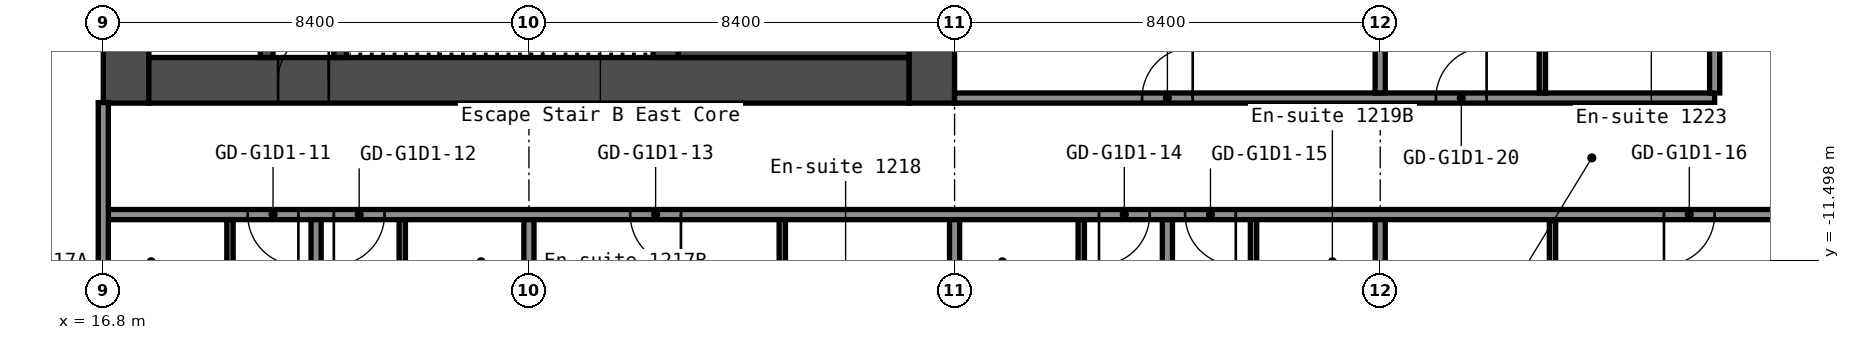
"""IFC4 building model, lengths in metres.
Left out: names, types, materials, properties, quantities, classifications, styles, units other than length and angle.
Written with IfcOpenShell. Run it as: python <this file> out.ifc"""

import sys

from ifc_helpers import new_model, si_unit, direction, frame, frame_2d, origin, place, context, subcontext, project, spatial, rectangle, extrude, element, fill, save


model = new_model("IFC4")
c1 = context("Model", 3, precision=1e-05, world=origin(), true_north=direction((0.0, 1.0)))
c2 = subcontext(c1, "Body", "Model", "MODEL_VIEW")
j1 = project(units=[si_unit("LENGTHUNIT", "METRE"), si_unit("PLANEANGLEUNIT", "RADIAN")], contexts=[c1])
p1 = place(None, origin())
s1 = spatial("IfcSite", under=j1, at=p1, CompositionType="ELEMENT")
p2 = place(p1, origin())
s2 = spatial("IfcBuilding", under=s1, at=p2, CompositionType="ELEMENT")
p3 = place(p2, frame((0.0, 0.0, 45.4)))
s3 = spatial("IfcBuildingStorey", under=s2, at=p3, CompositionType="ELEMENT", Elevation=45.4)
p4 = place(p3, frame((17.25, -8.4, 0.0), z_axis=(0.0, 0.0, 1.0), x_axis=(0.0, 1.0, 0.0)))
e1 = element("IfcWall", 1, at=p4, inside=s3, PredefinedType="SHEAR", context=c2, shape_type="SweptSolid", body=[
    extrude(rectangle(XDim=16.8, YDim=0.9, at=frame_2d((8.4, 0.0))), origin(), (0.0, 0.0, 1.0), 2.8),
])
p5 = place(p4, frame((12.75, 0.0, 0.0)))
e2 = element("IfcOpeningElement", 2, at=p5, cuts=e1, PredefinedType="OPENING", context=c2, shape_type="SweptSolid", body=[
    extrude(rectangle(XDim=1.2, YDim=2.1, at=frame_2d((0.6, 1.05))), frame((0.0, 0.46, 0.0), z_axis=(0.0, -1.0, 0.0), x_axis=(1.0, 0.0, 0.0)), (0.0, 0.0, 1.0), 0.92),
])
p6 = place(p4, frame((2.85, 0.0, 0.0)))
e3 = element("IfcOpeningElement", 3, at=p6, cuts=e1, PredefinedType="OPENING", context=c2, shape_type="SweptSolid", body=[
    extrude(rectangle(XDim=1.2, YDim=2.1, at=frame_2d((0.6, 1.05))), frame((0.0, 0.46, 0.0), z_axis=(0.0, -1.0, 0.0), x_axis=(1.0, 0.0, 0.0)), (0.0, 0.0, 1.0), 0.92),
])
p7 = place(p3, frame((33.15, -8.4, 0.0), z_axis=(0.0, 0.0, 1.0), x_axis=(0.0, 1.0, 0.0)))
e4 = element("IfcWall", 4, at=p7, inside=s3, PredefinedType="SHEAR", context=c2, shape_type="SweptSolid", body=[
    extrude(rectangle(XDim=16.8, YDim=0.9, at=frame_2d((8.4, 0.0))), origin(), (0.0, 0.0, 1.0), 2.8),
])
p8 = place(p3, frame((17.7, -7.95, 0.0), z_axis=(0.0, 0.0, 1.0), x_axis=(1.0, 0.0, 0.0)))
e5 = element("IfcWall", 5, at=p8, inside=s3, PredefinedType="SHEAR", context=c2, shape_type="SweptSolid", body=[
    extrude(rectangle(XDim=15.0, YDim=0.9, at=frame_2d((7.5, 0.0))), origin(), (0.0, 0.0, 1.0), 2.8),
])
p9 = place(p8, frame((2.55, 0.0, 0.0)))
e6 = element("IfcOpeningElement", 6, at=p9, cuts=e5, PredefinedType="OPENING", context=c2, shape_type="SweptSolid", body=[
    extrude(rectangle(XDim=1.0, YDim=2.1, at=frame_2d((0.5, 1.05))), frame((0.0, 0.46, 0.0), z_axis=(0.0, -1.0, 0.0), x_axis=(1.0, 0.0, 0.0)), (0.0, 0.0, 1.0), 0.92),
])
p10 = place(p3, frame((20.025, -7.5, 0.0), z_axis=(0.0, 0.0, 1.0), x_axis=(0.0, 1.0, 0.0)))
e7 = element("IfcWall", 7, at=p10, inside=s3, PredefinedType="SHEAR", context=c2, shape_type="SweptSolid", body=[
    extrude(rectangle(XDim=6.3, YDim=0.25, at=frame_2d((3.15, 0.0))), origin(), (0.0, 0.0, 1.0), 2.8),
])
p11 = place(p10, frame((2.4, 0.0, 0.0)))
e8 = element("IfcOpeningElement", 8, at=p11, cuts=e7, PredefinedType="OPENING", context=c2, shape_type="SweptSolid", body=[
    extrude(rectangle(XDim=1.0, YDim=2.1, at=frame_2d((0.5, 1.05))), frame((0.0, 0.135, 0.0), z_axis=(0.0, -1.0, 0.0), x_axis=(1.0, 0.0, 0.0)), (0.0, 0.0, 1.0), 0.27),
])
p12 = place(p3, frame((21.475, -7.5, 0.0), z_axis=(0.0, 0.0, 1.0), x_axis=(0.0, 1.0, 0.0)))
e9 = element("IfcWall", 9, at=p12, inside=s3, PredefinedType="SHEAR", context=c2, shape_type="SweptSolid", body=[
    extrude(rectangle(XDim=3.75, YDim=0.25, at=frame_2d((1.875, 0.0))), origin(), (0.0, 0.0, 1.0), 2.8),
])
p13 = place(p12, frame((1.3, 0.0, 0.0)))
e10 = element("IfcOpeningElement", 10, at=p13, cuts=e9, PredefinedType="OPENING", context=c2, shape_type="SweptSolid", body=[
    extrude(rectangle(XDim=1.2, YDim=2.1, at=frame_2d((0.6, 1.05))), frame((0.0, 0.135, 0.0), z_axis=(0.0, -1.0, 0.0), x_axis=(1.0, 0.0, 0.0)), (0.0, 0.0, 1.0), 0.27),
])
p14 = place(p3, frame((27.9, -7.5, 0.0), z_axis=(0.0, 0.0, 1.0), x_axis=(0.0, 1.0, 0.0)))
e11 = element("IfcWall", 11, at=p14, inside=s3, PredefinedType="SHEAR", context=c2, shape_type="SweptSolid", body=[
    extrude(rectangle(XDim=3.75, YDim=0.5, at=frame_2d((1.875, 0.0))), origin(), (0.0, 0.0, 1.0), 2.8),
])
p15 = place(p3, frame((28.15, -6.75, 0.0), z_axis=(0.0, 0.0, 1.0), x_axis=(1.0, 0.0, 0.0)))
e12 = element("IfcWall", 12, at=p15, inside=s3, PredefinedType="SHEAR", context=c2, shape_type="SweptSolid", body=[
    extrude(rectangle(XDim=4.55, YDim=1.5, at=frame_2d((2.275, 0.0))), origin(), (0.0, 0.0, 1.0), 2.8),
])
p16 = place(p3, frame((16.8, -10.6, 0.0), z_axis=(0.0, 0.0, 1.0), x_axis=(1.0, 0.0, 0.0)))
e13 = element("IfcWall", 13, at=p16, inside=s3, PredefinedType="PARTITIONING", context=c2, shape_type="SweptSolid", body=[
    extrude(rectangle(XDim=34.3, YDim=0.2, at=frame_2d((17.15, 0.0))), origin(), (0.0, 0.0, 1.0), 2.8),
])
p17 = place(p16, frame((2.85, 0.0, 0.0)))
e14 = element("IfcOpeningElement", 14, at=p17, cuts=e13, PredefinedType="OPENING", context=c2, shape_type="SweptSolid", body=[
    extrude(rectangle(XDim=1.0, YDim=2.1, at=frame_2d((0.5, 1.05))), frame((0.0, 0.11, 0.0), z_axis=(0.0, -1.0, 0.0), x_axis=(1.0, 0.0, 0.0)), (0.0, 0.0, 1.0), 0.22),
])
p18 = place(p16, frame((4.55, 0.0, 0.0)))
e15 = element("IfcOpeningElement", 15, at=p18, cuts=e13, PredefinedType="OPENING", context=c2, shape_type="SweptSolid", body=[
    extrude(rectangle(XDim=1.0, YDim=2.1, at=frame_2d((0.5, 1.05))), frame((0.0, 0.11, 0.0), z_axis=(0.0, -1.0, 0.0), x_axis=(1.0, 0.0, 0.0)), (0.0, 0.0, 1.0), 0.22),
])
p19 = place(p16, frame((10.4, 0.0, 0.0)))
e16 = element("IfcOpeningElement", 16, at=p19, cuts=e13, PredefinedType="OPENING", context=c2, shape_type="SweptSolid", body=[
    extrude(rectangle(XDim=1.0, YDim=2.1, at=frame_2d((0.5, 1.05))), frame((0.0, 0.11, 0.0), z_axis=(0.0, -1.0, 0.0), x_axis=(1.0, 0.0, 0.0)), (0.0, 0.0, 1.0), 0.22),
])
p20 = place(p16, frame((19.65, 0.0, 0.0)))
e17 = element("IfcOpeningElement", 17, at=p20, cuts=e13, PredefinedType="OPENING", context=c2, shape_type="SweptSolid", body=[
    extrude(rectangle(XDim=1.0, YDim=2.1, at=frame_2d((0.5, 1.05))), frame((0.0, 0.11, 0.0), z_axis=(0.0, -1.0, 0.0), x_axis=(1.0, 0.0, 0.0)), (0.0, 0.0, 1.0), 0.22),
])
p21 = place(p16, frame((21.35, 0.0, 0.0)))
e18 = element("IfcOpeningElement", 18, at=p21, cuts=e13, PredefinedType="OPENING", context=c2, shape_type="SweptSolid", body=[
    extrude(rectangle(XDim=1.0, YDim=2.1, at=frame_2d((0.5, 1.05))), frame((0.0, 0.11, 0.0), z_axis=(0.0, -1.0, 0.0), x_axis=(1.0, 0.0, 0.0)), (0.0, 0.0, 1.0), 0.22),
])
p22 = place(p16, frame((30.8, 0.0, 0.0)))
e19 = element("IfcOpeningElement", 19, at=p22, cuts=e13, PredefinedType="OPENING", context=c2, shape_type="SweptSolid", body=[
    extrude(rectangle(XDim=1.0, YDim=2.1, at=frame_2d((0.5, 1.05))), frame((0.0, 0.11, 0.0), z_axis=(0.0, -1.0, 0.0), x_axis=(1.0, 0.0, 0.0)), (0.0, 0.0, 1.0), 0.22),
])
p23 = place(p3, frame((33.6, -8.3, 0.0), z_axis=(0.0, 0.0, 1.0), x_axis=(1.0, 0.0, 0.0)))
e20 = element("IfcWall", 20, at=p23, inside=s3, PredefinedType="PARTITIONING", context=c2, shape_type="SweptSolid", body=[
    extrude(rectangle(XDim=15.0, YDim=0.2, at=frame_2d((7.5, 0.0))), origin(), (0.0, 0.0, 1.0), 2.8),
])
p24 = place(p23, frame((3.7, 0.0, 0.0)))
e21 = element("IfcOpeningElement", 21, at=p24, cuts=e20, PredefinedType="OPENING", context=c2, shape_type="SweptSolid", body=[
    extrude(rectangle(XDim=1.0, YDim=2.1, at=frame_2d((0.5, 1.05))), frame((0.0, 0.11, 0.0), z_axis=(0.0, -1.0, 0.0), x_axis=(1.0, 0.0, 0.0)), (0.0, 0.0, 1.0), 0.22),
])
p25 = place(p23, frame((9.5, 0.0, 0.0)))
e22 = element("IfcOpeningElement", 22, at=p25, cuts=e20, PredefinedType="OPENING", context=c2, shape_type="SweptSolid", body=[
    extrude(rectangle(XDim=1.0, YDim=2.1, at=frame_2d((0.5, 1.05))), frame((0.0, 0.11, 0.0), z_axis=(0.0, -1.0, 0.0), x_axis=(1.0, 0.0, 0.0)), (0.0, 0.0, 1.0), 0.22),
])
p26 = place(p3, frame((16.8, -20.3, 0.0), z_axis=(0.0, 0.0, 1.0), x_axis=(0.0, 1.0, 0.0)))
e23 = element("IfcWall", 23, at=p26, inside=s3, PredefinedType="PARTITIONING", context=c2, shape_type="SweptSolid", body=[
    extrude(rectangle(XDim=11.91, YDim=0.2, at=frame_2d((5.955, 0.0))), origin(), (0.0, 0.0, 1.0), 2.8),
])
p27 = place(p3, frame((19.3, -13.6, 0.0), z_axis=(0.0, 0.0, 1.0), x_axis=(0.0, 1.0, 0.0)))
e24 = element("IfcWall", 24, at=p27, inside=s3, PredefinedType="PARTITIONING", context=c2, shape_type="SweptSolid", body=[
    extrude(rectangle(XDim=2.9, YDim=0.125, at=frame_2d((1.45, 0.0))), origin(), (0.0, 0.0, 1.0), 2.8),
])
p28 = place(p27, frame((0.6, 0.0, 0.0)))
e25 = element("IfcOpeningElement", 25, at=p28, cuts=e24, PredefinedType="OPENING", context=c2, shape_type="SweptSolid", body=[
    extrude(rectangle(XDim=0.8, YDim=2.1, at=frame_2d((0.4, 1.05))), frame((0.0, 0.073, 0.0), z_axis=(0.0, -1.0, 0.0), x_axis=(1.0, 0.0, 0.0)), (0.0, 0.0, 1.0), 0.145),
])
p29 = place(p3, frame((21.0, -20.3, 0.0), z_axis=(0.0, 0.0, 1.0), x_axis=(0.0, 1.0, 0.0)))
e26 = element("IfcWall", 26, at=p29, inside=s3, PredefinedType="PARTITIONING", context=c2, shape_type="SweptSolid", body=[
    extrude(rectangle(XDim=9.6, YDim=0.2, at=frame_2d((4.8, 0.0))), origin(), (0.0, 0.0, 1.0), 2.8),
])
p30 = place(p3, frame((22.7, -13.6, 0.0), z_axis=(0.0, 0.0, 1.0), x_axis=(0.0, 1.0, 0.0)))
e27 = element("IfcWall", 27, at=p30, inside=s3, PredefinedType="PARTITIONING", context=c2, shape_type="SweptSolid", body=[
    extrude(rectangle(XDim=2.9, YDim=0.125, at=frame_2d((1.45, 0.0))), origin(), (0.0, 0.0, 1.0), 2.8),
])
p31 = place(p30, frame((0.6, 0.0, 0.0)))
e28 = element("IfcOpeningElement", 28, at=p31, cuts=e27, PredefinedType="OPENING", context=c2, shape_type="SweptSolid", body=[
    extrude(rectangle(XDim=0.8, YDim=2.1, at=frame_2d((0.4, 1.05))), frame((0.0, 0.073, 0.0), z_axis=(0.0, -1.0, 0.0), x_axis=(1.0, 0.0, 0.0)), (0.0, 0.0, 1.0), 0.145),
])
p32 = place(p3, frame((25.2, -20.3, 0.0), z_axis=(0.0, 0.0, 1.0), x_axis=(0.0, 1.0, 0.0)))
e29 = element("IfcWall", 29, at=p32, inside=s3, PredefinedType="PARTITIONING", context=c2, shape_type="SweptSolid", body=[
    extrude(rectangle(XDim=9.6, YDim=0.2, at=frame_2d((4.8, 0.0))), origin(), (0.0, 0.0, 1.0), 2.8),
])
p33 = place(p3, frame((30.2, -14.0, 0.0), z_axis=(0.0, 0.0, 1.0), x_axis=(0.0, 1.0, 0.0)))
e30 = element("IfcWall", 30, at=p33, inside=s3, PredefinedType="PARTITIONING", context=c2, shape_type="SweptSolid", body=[
    extrude(rectangle(XDim=3.3, YDim=0.125, at=frame_2d((1.65, 0.0))), origin(), (0.0, 0.0, 1.0), 2.8),
])
p34 = place(p3, frame((33.6, -20.3, 0.0), z_axis=(0.0, 0.0, 1.0), x_axis=(0.0, 1.0, 0.0)))
e31 = element("IfcWall", 31, at=p34, inside=s3, PredefinedType="PARTITIONING", context=c2, shape_type="SweptSolid", body=[
    extrude(rectangle(XDim=9.6, YDim=0.2, at=frame_2d((4.8, 0.0))), origin(), (0.0, 0.0, 1.0), 2.8),
])
p35 = place(p3, frame((36.1, -13.6, 0.0), z_axis=(0.0, 0.0, 1.0), x_axis=(0.0, 1.0, 0.0)))
e32 = element("IfcWall", 32, at=p35, inside=s3, PredefinedType="PARTITIONING", context=c2, shape_type="SweptSolid", body=[
    extrude(rectangle(XDim=2.9, YDim=0.125, at=frame_2d((1.45, 0.0))), origin(), (0.0, 0.0, 1.0), 2.8),
])
p36 = place(p35, frame((0.6, 0.0, 0.0)))
e33 = element("IfcOpeningElement", 33, at=p36, cuts=e32, PredefinedType="OPENING", context=c2, shape_type="SweptSolid", body=[
    extrude(rectangle(XDim=0.8, YDim=2.1, at=frame_2d((0.4, 1.05))), frame((0.0, 0.073, 0.0), z_axis=(0.0, -1.0, 0.0), x_axis=(1.0, 0.0, 0.0)), (0.0, 0.0, 1.0), 0.145),
])
p37 = place(p3, frame((37.8, -20.3, 0.0), z_axis=(0.0, 0.0, 1.0), x_axis=(0.0, 1.0, 0.0)))
e34 = element("IfcWall", 34, at=p37, inside=s3, PredefinedType="PARTITIONING", context=c2, shape_type="SweptSolid", body=[
    extrude(rectangle(XDim=9.6, YDim=0.2, at=frame_2d((4.8, 0.0))), origin(), (0.0, 0.0, 1.0), 2.8),
])
p38 = place(p3, frame((39.5, -13.6, 0.0), z_axis=(0.0, 0.0, 1.0), x_axis=(0.0, 1.0, 0.0)))
e35 = element("IfcWall", 35, at=p38, inside=s3, PredefinedType="PARTITIONING", context=c2, shape_type="SweptSolid", body=[
    extrude(rectangle(XDim=2.9, YDim=0.125, at=frame_2d((1.45, 0.0))), origin(), (0.0, 0.0, 1.0), 2.8),
])
p39 = place(p38, frame((0.6, 0.0, 0.0)))
e36 = element("IfcOpeningElement", 36, at=p39, cuts=e35, PredefinedType="OPENING", context=c2, shape_type="SweptSolid", body=[
    extrude(rectangle(XDim=0.8, YDim=2.1, at=frame_2d((0.4, 1.05))), frame((0.0, 0.073, 0.0), z_axis=(0.0, -1.0, 0.0), x_axis=(1.0, 0.0, 0.0)), (0.0, 0.0, 1.0), 0.145),
])
p40 = place(p3, frame((42.0, -20.3, 0.0), z_axis=(0.0, 0.0, 1.0), x_axis=(0.0, 1.0, 0.0)))
e37 = element("IfcWall", 37, at=p40, inside=s3, PredefinedType="PARTITIONING", context=c2, shape_type="SweptSolid", body=[
    extrude(rectangle(XDim=9.6, YDim=0.2, at=frame_2d((4.8, 0.0))), origin(), (0.0, 0.0, 1.0), 2.8),
])
p41 = place(p3, frame((42.0, -8.2, 0.0), z_axis=(0.0, 0.0, 1.0), x_axis=(0.0, 1.0, 0.0)))
e38 = element("IfcWall", 38, at=p41, inside=s3, PredefinedType="PARTITIONING", context=c2, shape_type="SweptSolid", body=[
    extrude(rectangle(XDim=8.2, YDim=0.2, at=frame_2d((4.1, 0.0))), origin(), (0.0, 0.0, 1.0), 2.8),
])
for number, where, z_axis, x_axis in (
    (39, (45.2, -8.2, 0.0), (0.0, 0.0, 1.0), (0.0, 1.0, 0.0)),
    (40, (45.4, -14.0, 0.0), (0.0, 0.0, 1.0), (0.0, 1.0, 0.0)),
):
    element("IfcWall", number, at=place(p3, frame(where, z_axis=z_axis, x_axis=x_axis)), inside=s3, PredefinedType="PARTITIONING", context=c2, shape_type="SweptSolid", body=[
        extrude(rectangle(XDim=3.3, YDim=0.125, at=frame_2d((1.65, 0.0))), origin(), (0.0, 0.0, 1.0), 2.8),
    ])
p42 = place(p3, frame((48.6, -8.2, 0.0), z_axis=(0.0, 0.0, 1.0), x_axis=(0.0, 1.0, 0.0)))
e41 = element("IfcWall", 41, at=p42, inside=s3, PredefinedType="PARTITIONING", context=c2, shape_type="SweptSolid", body=[
    extrude(rectangle(XDim=16.4, YDim=0.2, at=frame_2d((8.2, 0.0))), origin(), (0.0, 0.0, 1.0), 2.8),
])
p43 = place(p9, origin())
e42 = element("IfcDoor", 42, at=p43, inside=s3, OperationType="SINGLE_SWING_LEFT", PredefinedType="DOOR", context=c2, shape_type="SweptSolid", body=[
    extrude(rectangle(XDim=1.0, YDim=2.1, at=frame_2d((0.5, 1.05))), frame((0.0, 0.025, 0.0), z_axis=(0.0, -1.0, 0.0), x_axis=(1.0, 0.0, 0.0)), (0.0, 0.0, 1.0), 0.05),
])
fill(e6, e42)
p44 = place(p17, origin())
e43 = element("IfcDoor", 43, at=p44, inside=s3, OperationType="SINGLE_SWING_RIGHT", PredefinedType="DOOR", context=c2, shape_type="SweptSolid", body=[
    extrude(rectangle(XDim=1.0, YDim=2.1, at=frame_2d((0.5, 1.05))), frame((0.0, 0.025, 0.0), z_axis=(0.0, -1.0, 0.0), x_axis=(1.0, 0.0, 0.0)), (0.0, 0.0, 1.0), 0.05),
])
fill(e14, e43)
p45 = place(p18, origin())
e44 = element("IfcDoor", 44, at=p45, inside=s3, OperationType="SINGLE_SWING_LEFT", PredefinedType="DOOR", context=c2, shape_type="SweptSolid", body=[
    extrude(rectangle(XDim=1.0, YDim=2.1, at=frame_2d((0.5, 1.05))), frame((0.0, 0.025, 0.0), z_axis=(0.0, -1.0, 0.0), x_axis=(1.0, 0.0, 0.0)), (0.0, 0.0, 1.0), 0.05),
])
fill(e15, e44)
p46 = place(p19, origin())
e45 = element("IfcDoor", 45, at=p46, inside=s3, OperationType="SINGLE_SWING_RIGHT", PredefinedType="DOOR", context=c2, shape_type="SweptSolid", body=[
    extrude(rectangle(XDim=1.0, YDim=2.1, at=frame_2d((0.5, 1.05))), frame((0.0, 0.025, 0.0), z_axis=(0.0, -1.0, 0.0), x_axis=(1.0, 0.0, 0.0)), (0.0, 0.0, 1.0), 0.05),
])
fill(e16, e45)
p47 = place(p20, origin())
e46 = element("IfcDoor", 46, at=p47, inside=s3, OperationType="SINGLE_SWING_LEFT", PredefinedType="DOOR", context=c2, shape_type="SweptSolid", body=[
    extrude(rectangle(XDim=1.0, YDim=2.1, at=frame_2d((0.5, 1.05))), frame((0.0, 0.025, 0.0), z_axis=(0.0, -1.0, 0.0), x_axis=(1.0, 0.0, 0.0)), (0.0, 0.0, 1.0), 0.05),
])
fill(e17, e46)
p48 = place(p21, origin())
e47 = element("IfcDoor", 47, at=p48, inside=s3, OperationType="SINGLE_SWING_RIGHT", PredefinedType="DOOR", context=c2, shape_type="SweptSolid", body=[
    extrude(rectangle(XDim=1.0, YDim=2.1, at=frame_2d((0.5, 1.05))), frame((0.0, 0.025, 0.0), z_axis=(0.0, -1.0, 0.0), x_axis=(1.0, 0.0, 0.0)), (0.0, 0.0, 1.0), 0.05),
])
fill(e18, e47)
p49 = place(p22, origin())
e48 = element("IfcDoor", 48, at=p49, inside=s3, OperationType="SINGLE_SWING_LEFT", PredefinedType="DOOR", context=c2, shape_type="SweptSolid", body=[
    extrude(rectangle(XDim=1.0, YDim=2.1, at=frame_2d((0.5, 1.05))), frame((0.0, 0.025, 0.0), z_axis=(0.0, -1.0, 0.0), x_axis=(1.0, 0.0, 0.0)), (0.0, 0.0, 1.0), 0.05),
])
fill(e19, e48)
p50 = place(p24, origin())
e49 = element("IfcDoor", 49, at=p50, inside=s3, OperationType="SINGLE_SWING_LEFT", PredefinedType="DOOR", context=c2, shape_type="SweptSolid", body=[
    extrude(rectangle(XDim=1.0, YDim=2.1, at=frame_2d((0.5, 1.05))), frame((0.0, 0.025, 0.0), z_axis=(0.0, -1.0, 0.0), x_axis=(1.0, 0.0, 0.0)), (0.0, 0.0, 1.0), 0.05),
])
fill(e21, e49)
p51 = place(p25, origin())
e50 = element("IfcDoor", 50, at=p51, inside=s3, OperationType="SINGLE_SWING_LEFT", PredefinedType="DOOR", context=c2, shape_type="SweptSolid", body=[
    extrude(rectangle(XDim=1.0, YDim=2.1, at=frame_2d((0.5, 1.05))), frame((0.0, 0.025, 0.0), z_axis=(0.0, -1.0, 0.0), x_axis=(1.0, 0.0, 0.0)), (0.0, 0.0, 1.0), 0.05),
])
fill(e22, e50)
save(model, sys.argv[1])
